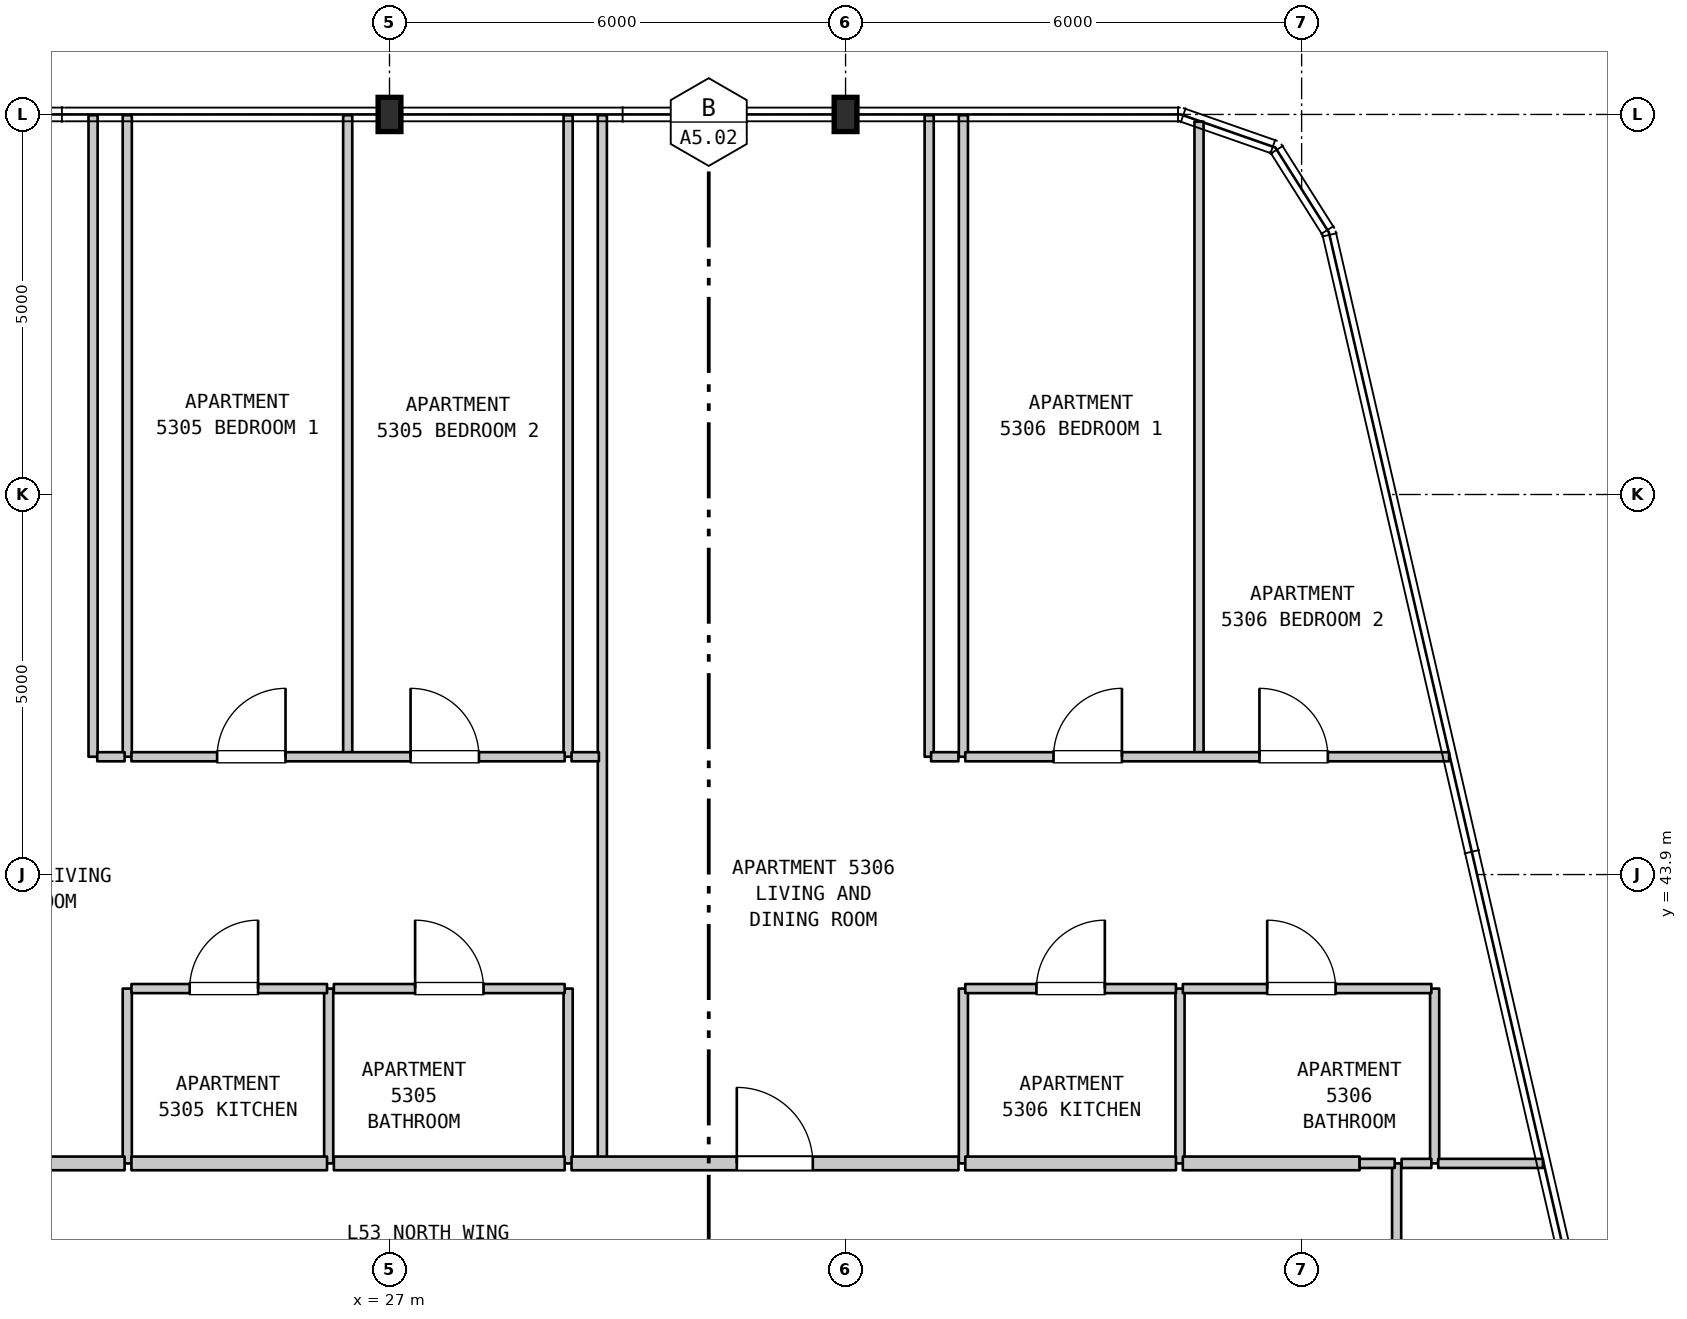
"""IFC4 building model, lengths in metres.
Left out: names, types, materials, properties, quantities, classifications, styles, units other than length and angle.
Written with IfcOpenShell. Run it as: python <this file> out.ifc"""

import sys

from ifc_helpers import new_model, si_unit, direction, frame, frame_2d, origin, origin_2d, place, context, subcontext, project, spatial, rectangle, i_section, extrude, element, fill, save


model = new_model("IFC4")
c1 = context("Model", 3, precision=1e-05, world=origin(), true_north=direction((0.0, 1.0)))
c2 = subcontext(c1, "Body", "Model", "MODEL_VIEW")
j1 = project(units=[si_unit("LENGTHUNIT", "METRE"), si_unit("PLANEANGLEUNIT", "RADIAN")], contexts=[c1])
p1 = place(None, origin())
s1 = spatial("IfcSite", under=j1, at=p1, CompositionType="ELEMENT")
p2 = place(p1, origin())
s2 = spatial("IfcBuilding", under=s1, at=p2, CompositionType="ELEMENT")
p3 = place(p2, frame((0.0, 0.0, 214.3)))
s3 = spatial("IfcBuildingStorey", under=s2, at=p3, CompositionType="ELEMENT", Elevation=214.3)
for number, where, z_axis, x_axis in (
    (1, (27.0, 53.9, 0.0), (0.0, 0.0, 1.0), (1.0, 0.0, 0.0)),
    (2, (33.0, 53.9, 0.0), (0.0, 0.0, 1.0), (1.0, 0.0, 0.0)),
):
    element("IfcColumn", number, at=place(p3, frame(where, z_axis=z_axis, x_axis=x_axis)), inside=s3, PredefinedType="COLUMN", context=c2, shape_type="SweptSolid", body=[
        extrude(i_section(OverallWidth=0.3, OverallDepth=0.45, WebThickness=0.014, FlangeThickness=0.026, FilletRadius=0.027, at=origin_2d()), origin(), (0.0, 0.0, 1.0), 3.7),
    ])
p4 = place(p3, frame((23.1, 45.45, 0.0), z_axis=(0.0, 0.0, 1.0), x_axis=(0.0, 1.0, 0.0)))
e3 = element("IfcWall", 3, at=p4, inside=s3, PredefinedType="PARTITIONING", context=c2, shape_type="SweptSolid", body=[
    extrude(rectangle(XDim=8.44, YDim=0.12, at=frame_2d((4.22, 0.0))), origin(), (0.0, 0.0, 1.0), 3.38),
])
p5 = place(p3, frame((23.55, 40.1, 0.0), z_axis=(0.0, 0.0, 1.0), x_axis=(0.0, 1.0, 0.0)))
e4 = element("IfcWall", 4, at=p5, inside=s3, PredefinedType="PARTITIONING", context=c2, shape_type="SweptSolid", body=[
    extrude(rectangle(XDim=2.3, YDim=0.12, at=frame_2d((1.15, 0.0))), origin(), (0.0, 0.0, 1.0), 3.38),
])
p6 = place(p3, frame((23.55, 45.45, 0.0), z_axis=(0.0, 0.0, 1.0), x_axis=(0.0, 1.0, 0.0)))
e5 = element("IfcWall", 5, at=p6, inside=s3, PredefinedType="PARTITIONING", context=c2, shape_type="SweptSolid", body=[
    extrude(rectangle(XDim=8.44, YDim=0.12, at=frame_2d((4.22, 0.0))), origin(), (0.0, 0.0, 1.0), 3.38),
])
p7 = place(p3, frame((26.2, 40.1, 0.0), z_axis=(0.0, 0.0, 1.0), x_axis=(0.0, 1.0, 0.0)))
e6 = element("IfcWall", 6, at=p7, inside=s3, PredefinedType="PARTITIONING", context=c2, shape_type="SweptSolid", body=[
    extrude(rectangle(XDim=2.3, YDim=0.12, at=frame_2d((1.15, 0.0))), origin(), (0.0, 0.0, 1.0), 3.38),
])
p8 = place(p3, frame((26.45, 45.45, 0.0), z_axis=(0.0, 0.0, 1.0), x_axis=(0.0, 1.0, 0.0)))
e7 = element("IfcWall", 7, at=p8, inside=s3, PredefinedType="PARTITIONING", context=c2, shape_type="SweptSolid", body=[
    extrude(rectangle(XDim=8.44, YDim=0.12, at=frame_2d((4.22, 0.0))), origin(), (0.0, 0.0, 1.0), 3.38),
])
p9 = place(p3, frame((29.35, 40.1, 0.0), z_axis=(0.0, 0.0, 1.0), x_axis=(0.0, 1.0, 0.0)))
e8 = element("IfcWall", 8, at=p9, inside=s3, PredefinedType="PARTITIONING", context=c2, shape_type="SweptSolid", body=[
    extrude(rectangle(XDim=2.3, YDim=0.12, at=frame_2d((1.15, 0.0))), origin(), (0.0, 0.0, 1.0), 3.38),
])
p10 = place(p3, frame((29.35, 45.45, 0.0), z_axis=(0.0, 0.0, 1.0), x_axis=(0.0, 1.0, 0.0)))
e9 = element("IfcWall", 9, at=p10, inside=s3, PredefinedType="PARTITIONING", context=c2, shape_type="SweptSolid", body=[
    extrude(rectangle(XDim=8.44, YDim=0.12, at=frame_2d((4.22, 0.0))), origin(), (0.0, 0.0, 1.0), 3.38),
])
p11 = place(p3, frame((29.8, 40.1, 0.0), z_axis=(0.0, 0.0, 1.0), x_axis=(0.0, 1.0, 0.0)))
e10 = element("IfcWall", 10, at=p11, inside=s3, PredefinedType="PARTITIONING", context=c2, shape_type="SweptSolid", body=[
    extrude(rectangle(XDim=13.79, YDim=0.12, at=frame_2d((6.895, 0.0))), origin(), (0.0, 0.0, 1.0), 3.38),
])
p12 = place(p3, frame((34.1, 45.45, 0.0), z_axis=(0.0, 0.0, 1.0), x_axis=(0.0, 1.0, 0.0)))
e11 = element("IfcWall", 11, at=p12, inside=s3, PredefinedType="PARTITIONING", context=c2, shape_type="SweptSolid", body=[
    extrude(rectangle(XDim=8.44, YDim=0.12, at=frame_2d((4.22, 0.0))), origin(), (0.0, 0.0, 1.0), 3.38),
])
p13 = place(p3, frame((34.55, 40.1, 0.0), z_axis=(0.0, 0.0, 1.0), x_axis=(0.0, 1.0, 0.0)))
e12 = element("IfcWall", 12, at=p13, inside=s3, PredefinedType="PARTITIONING", context=c2, shape_type="SweptSolid", body=[
    extrude(rectangle(XDim=2.3, YDim=0.12, at=frame_2d((1.15, 0.0))), origin(), (0.0, 0.0, 1.0), 3.38),
])
p14 = place(p3, frame((34.55, 45.45, 0.0), z_axis=(0.0, 0.0, 1.0), x_axis=(0.0, 1.0, 0.0)))
e13 = element("IfcWall", 13, at=p14, inside=s3, PredefinedType="PARTITIONING", context=c2, shape_type="SweptSolid", body=[
    extrude(rectangle(XDim=8.44, YDim=0.12, at=frame_2d((4.22, 0.0))), origin(), (0.0, 0.0, 1.0), 3.38),
])
p15 = place(p3, frame((37.4, 40.1, 0.0), z_axis=(0.0, 0.0, 1.0), x_axis=(0.0, 1.0, 0.0)))
e14 = element("IfcWall", 14, at=p15, inside=s3, PredefinedType="PARTITIONING", context=c2, shape_type="SweptSolid", body=[
    extrude(rectangle(XDim=2.3, YDim=0.12, at=frame_2d((1.15, 0.0))), origin(), (0.0, 0.0, 1.0), 3.38),
])
p16 = place(p3, frame((37.65, 45.45, 0.0), z_axis=(0.0, 0.0, 1.0), x_axis=(0.0, 1.0, 0.0)))
e15 = element("IfcWall", 15, at=p16, inside=s3, PredefinedType="PARTITIONING", context=c2, shape_type="SweptSolid", body=[
    extrude(rectangle(XDim=8.356, YDim=0.12, at=frame_2d((4.178, 0.0))), origin(), (0.0, 0.0, 1.0), 3.38),
])
p17 = place(p3, frame((40.25, 37.9, 0.0), z_axis=(0.0, 0.0, 1.0), x_axis=(0.0, 1.0, 0.0)))
e16 = element("IfcWall", 16, at=p17, inside=s3, PredefinedType="PARTITIONING", context=c2, shape_type="SweptSolid", body=[
    extrude(rectangle(XDim=2.2, YDim=0.12, at=frame_2d((1.1, 0.0))), origin(), (0.0, 0.0, 1.0), 3.38),
])
p18 = place(p3, frame((40.75, 40.1, 0.0), z_axis=(0.0, 0.0, 1.0), x_axis=(0.0, 1.0, 0.0)))
e17 = element("IfcWall", 17, at=p18, inside=s3, PredefinedType="PARTITIONING", context=c2, shape_type="SweptSolid", body=[
    extrude(rectangle(XDim=2.3, YDim=0.12, at=frame_2d((1.15, 0.0))), origin(), (0.0, 0.0, 1.0), 3.38),
])
p19 = place(p3, frame((19.555, 40.1, 0.0), z_axis=(0.0, 0.0, 1.0), x_axis=(1.0, 0.0, 0.0)))
e18 = element("IfcWall", 18, at=p19, inside=s3, PredefinedType="STANDARD", context=c2, shape_type="SweptSolid", body=[
    extrude(rectangle(XDim=3.96, YDim=0.18, at=frame_2d((1.98, 0.0))), origin(), (0.0, 0.0, 1.0), 3.38),
])
p20 = place(p19, frame((1.48, 0.0, 0.0)))
e19 = element("IfcOpeningElement", 19, at=p20, cuts=e18, PredefinedType="OPENING", context=c2, shape_type="SweptSolid", body=[
    extrude(rectangle(XDim=1.0, YDim=2.15, at=frame_2d((0.5, 1.075))), frame((0.0, 0.1, 0.0), z_axis=(0.0, -1.0, 0.0), x_axis=(1.0, 0.0, 0.0)), (0.0, 0.0, 1.0), 0.2),
])
p21 = place(p3, frame((23.605, 40.1, 0.0), z_axis=(0.0, 0.0, 1.0), x_axis=(1.0, 0.0, 0.0)))
e20 = element("IfcWall", 20, at=p21, inside=s3, PredefinedType="STANDARD", context=c2, shape_type="SweptSolid", body=[
    extrude(rectangle(XDim=2.573, YDim=0.18, at=frame_2d((1.287, 0.0))), origin(), (0.0, 0.0, 1.0), 3.38),
])
p22 = place(p3, frame((26.268, 40.1, 0.0), z_axis=(0.0, 0.0, 1.0), x_axis=(1.0, 0.0, 0.0)))
e21 = element("IfcWall", 21, at=p22, inside=s3, PredefinedType="STANDARD", context=c2, shape_type="SweptSolid", body=[
    extrude(rectangle(XDim=3.037, YDim=0.18, at=frame_2d((1.519, 0.0))), origin(), (0.0, 0.0, 1.0), 3.38),
])
p23 = place(p3, frame((29.395, 40.1, 0.0), z_axis=(0.0, 0.0, 1.0), x_axis=(1.0, 0.0, 0.0)))
e22 = element("IfcWall", 22, at=p23, inside=s3, PredefinedType="STANDARD", context=c2, shape_type="SweptSolid", body=[
    extrude(rectangle(XDim=5.09, YDim=0.18, at=frame_2d((2.545, 0.0))), origin(), (0.0, 0.0, 1.0), 3.38),
])
p24 = place(p23, frame((2.174, 0.0, 0.0)))
e23 = element("IfcOpeningElement", 23, at=p24, cuts=e22, PredefinedType="OPENING", context=c2, shape_type="SweptSolid", body=[
    extrude(rectangle(XDim=1.0, YDim=2.15, at=frame_2d((0.5, 1.075))), frame((0.0, 0.1, 0.0), z_axis=(0.0, -1.0, 0.0), x_axis=(1.0, 0.0, 0.0)), (0.0, 0.0, 1.0), 0.2),
])
p25 = place(p3, frame((34.575, 40.1, 0.0), z_axis=(0.0, 0.0, 1.0), x_axis=(1.0, 0.0, 0.0)))
e24 = element("IfcWall", 24, at=p25, inside=s3, PredefinedType="STANDARD", context=c2, shape_type="SweptSolid", body=[
    extrude(rectangle(XDim=2.772, YDim=0.18, at=frame_2d((1.386, 0.0))), origin(), (0.0, 0.0, 1.0), 3.38),
])
p26 = place(p3, frame((37.437, 40.1, 0.0), z_axis=(0.0, 0.0, 1.0), x_axis=(1.0, 0.0, 0.0)))
e25 = element("IfcWall", 25, at=p26, inside=s3, PredefinedType="STANDARD", context=c2, shape_type="SweptSolid", body=[
    extrude(rectangle(XDim=2.326, YDim=0.18, at=frame_2d((1.163, 0.0))), origin(), (0.0, 0.0, 1.0), 3.38),
])
p27 = place(p3, frame((39.763, 40.1, 0.0), z_axis=(0.0, 0.0, 1.0), x_axis=(1.0, 0.0, 0.0)))
e26 = element("IfcWall", 26, at=p27, inside=s3, PredefinedType="PARTITIONING", context=c2, shape_type="SweptSolid", body=[
    extrude(rectangle(XDim=0.462, YDim=0.12, at=frame_2d((0.231, 0.0))), origin(), (0.0, 0.0, 1.0), 3.38),
])
p28 = place(p3, frame((40.315, 40.1, 0.0), z_axis=(0.0, 0.0, 1.0), x_axis=(1.0, 0.0, 0.0)))
e27 = element("IfcWall", 27, at=p28, inside=s3, PredefinedType="PARTITIONING", context=c2, shape_type="SweptSolid", body=[
    extrude(rectangle(XDim=0.392, YDim=0.12, at=frame_2d((0.196, 0.0))), origin(), (0.0, 0.0, 1.0), 3.38),
])
p29 = place(p3, frame((40.797, 40.1, 0.0), z_axis=(0.0, 0.0, 1.0), x_axis=(1.0, 0.0, 0.0)))
e28 = element("IfcWall", 28, at=p29, inside=s3, PredefinedType="PARTITIONING", context=c2, shape_type="SweptSolid", body=[
    extrude(rectangle(XDim=1.378, YDim=0.12, at=frame_2d((0.689, 0.0))), origin(), (0.0, 0.0, 1.0), 3.38),
])
p30 = place(p3, frame((23.605, 42.4, 0.0), z_axis=(0.0, 0.0, 1.0), x_axis=(1.0, 0.0, 0.0)))
e29 = element("IfcWall", 29, at=p30, inside=s3, PredefinedType="PARTITIONING", context=c2, shape_type="SweptSolid", body=[
    extrude(rectangle(XDim=2.573, YDim=0.12, at=frame_2d((1.287, 0.0))), origin(), (0.0, 0.0, 1.0), 3.38),
])
p31 = place(p30, frame((0.766, 0.0, 0.0)))
e30 = element("IfcOpeningElement", 30, at=p31, cuts=e29, PredefinedType="OPENING", context=c2, shape_type="SweptSolid", body=[
    extrude(rectangle(XDim=0.9, YDim=2.15, at=frame_2d((0.45, 1.075))), frame((0.0, 0.07, 0.0), z_axis=(0.0, -1.0, 0.0), x_axis=(1.0, 0.0, 0.0)), (0.0, 0.0, 1.0), 0.14),
])
p32 = place(p3, frame((26.268, 42.4, 0.0), z_axis=(0.0, 0.0, 1.0), x_axis=(1.0, 0.0, 0.0)))
e31 = element("IfcWall", 31, at=p32, inside=s3, PredefinedType="PARTITIONING", context=c2, shape_type="SweptSolid", body=[
    extrude(rectangle(XDim=3.037, YDim=0.12, at=frame_2d((1.519, 0.0))), origin(), (0.0, 0.0, 1.0), 3.38),
])
p33 = place(p32, frame((1.069, 0.0, 0.0)))
e32 = element("IfcOpeningElement", 32, at=p33, cuts=e31, PredefinedType="OPENING", context=c2, shape_type="SweptSolid", body=[
    extrude(rectangle(XDim=0.9, YDim=2.1, at=frame_2d((0.45, 1.05))), frame((0.0, 0.07, 0.0), z_axis=(0.0, -1.0, 0.0), x_axis=(1.0, 0.0, 0.0)), (0.0, 0.0, 1.0), 0.14),
])
p34 = place(p3, frame((34.575, 42.4, 0.0), z_axis=(0.0, 0.0, 1.0), x_axis=(1.0, 0.0, 0.0)))
e33 = element("IfcWall", 33, at=p34, inside=s3, PredefinedType="PARTITIONING", context=c2, shape_type="SweptSolid", body=[
    extrude(rectangle(XDim=2.772, YDim=0.12, at=frame_2d((1.386, 0.0))), origin(), (0.0, 0.0, 1.0), 3.38),
])
p35 = place(p34, frame((0.936, 0.0, 0.0)))
e34 = element("IfcOpeningElement", 34, at=p35, cuts=e33, PredefinedType="OPENING", context=c2, shape_type="SweptSolid", body=[
    extrude(rectangle(XDim=0.9, YDim=2.15, at=frame_2d((0.45, 1.075))), frame((0.0, 0.07, 0.0), z_axis=(0.0, -1.0, 0.0), x_axis=(1.0, 0.0, 0.0)), (0.0, 0.0, 1.0), 0.14),
])
p36 = place(p3, frame((37.437, 42.4, 0.0), z_axis=(0.0, 0.0, 1.0), x_axis=(1.0, 0.0, 0.0)))
e35 = element("IfcWall", 35, at=p36, inside=s3, PredefinedType="PARTITIONING", context=c2, shape_type="SweptSolid", body=[
    extrude(rectangle(XDim=3.27, YDim=0.12, at=frame_2d((1.635, 0.0))), origin(), (0.0, 0.0, 1.0), 3.38),
])
p37 = place(p36, frame((1.11, 0.0, 0.0)))
e36 = element("IfcOpeningElement", 36, at=p37, cuts=e35, PredefinedType="OPENING", context=c2, shape_type="SweptSolid", body=[
    extrude(rectangle(XDim=0.9, YDim=2.1, at=frame_2d((0.45, 1.05))), frame((0.0, 0.07, 0.0), z_axis=(0.0, -1.0, 0.0), x_axis=(1.0, 0.0, 0.0)), (0.0, 0.0, 1.0), 0.14),
])
p38 = place(p3, frame((23.155, 45.45, 0.0), z_axis=(0.0, 0.0, 1.0), x_axis=(1.0, 0.0, 0.0)))
e37 = element("IfcWall", 37, at=p38, inside=s3, PredefinedType="PARTITIONING", context=c2, shape_type="SweptSolid", body=[
    extrude(rectangle(XDim=0.36, YDim=0.12, at=frame_2d((0.18, 0.0))), origin(), (0.0, 0.0, 1.0), 3.38),
])
p39 = place(p3, frame((23.605, 45.45, 0.0), z_axis=(0.0, 0.0, 1.0), x_axis=(1.0, 0.0, 0.0)))
e38 = element("IfcWall", 38, at=p39, inside=s3, PredefinedType="PARTITIONING", context=c2, shape_type="SweptSolid", body=[
    extrude(rectangle(XDim=5.7, YDim=0.12, at=frame_2d((2.85, 0.0))), origin(), (0.0, 0.0, 1.0), 3.38),
])
p40 = place(p39, frame((1.127, 0.0, 0.0)))
e39 = element("IfcOpeningElement", 39, at=p40, cuts=e38, PredefinedType="OPENING", context=c2, shape_type="SweptSolid", body=[
    extrude(rectangle(XDim=0.9, YDim=2.15, at=frame_2d((0.45, 1.075))), frame((0.0, 0.07, 0.0), z_axis=(0.0, -1.0, 0.0), x_axis=(1.0, 0.0, 0.0)), (0.0, 0.0, 1.0), 0.14),
])
p41 = place(p39, frame((3.672, 0.0, 0.0)))
e40 = element("IfcOpeningElement", 40, at=p41, cuts=e38, PredefinedType="OPENING", context=c2, shape_type="SweptSolid", body=[
    extrude(rectangle(XDim=0.9, YDim=2.15, at=frame_2d((0.45, 1.075))), frame((0.0, 0.07, 0.0), z_axis=(0.0, -1.0, 0.0), x_axis=(1.0, 0.0, 0.0)), (0.0, 0.0, 1.0), 0.14),
])
p42 = place(p3, frame((29.395, 45.45, 0.0), z_axis=(0.0, 0.0, 1.0), x_axis=(1.0, 0.0, 0.0)))
e41 = element("IfcWall", 41, at=p42, inside=s3, PredefinedType="PARTITIONING", context=c2, shape_type="SweptSolid", body=[
    extrude(rectangle(XDim=0.36, YDim=0.12, at=frame_2d((0.18, 0.0))), origin(), (0.0, 0.0, 1.0), 3.38),
])
p43 = place(p3, frame((34.125, 45.45, 0.0), z_axis=(0.0, 0.0, 1.0), x_axis=(1.0, 0.0, 0.0)))
e42 = element("IfcWall", 42, at=p43, inside=s3, PredefinedType="PARTITIONING", context=c2, shape_type="SweptSolid", body=[
    extrude(rectangle(XDim=0.36, YDim=0.12, at=frame_2d((0.18, 0.0))), origin(), (0.0, 0.0, 1.0), 3.38),
])
p44 = place(p3, frame((34.575, 45.45, 0.0), z_axis=(0.0, 0.0, 1.0), x_axis=(1.0, 0.0, 0.0)))
e43 = element("IfcWall", 43, at=p44, inside=s3, PredefinedType="PARTITIONING", context=c2, shape_type="SweptSolid", body=[
    extrude(rectangle(XDim=6.365, YDim=0.12, at=frame_2d((3.183, 0.0))), origin(), (0.0, 0.0, 1.0), 3.38),
])
p45 = place(p44, frame((1.161, 0.0, 0.0)))
e44 = element("IfcOpeningElement", 44, at=p45, cuts=e43, PredefinedType="OPENING", context=c2, shape_type="SweptSolid", body=[
    extrude(rectangle(XDim=0.9, YDim=2.15, at=frame_2d((0.45, 1.075))), frame((0.0, 0.07, 0.0), z_axis=(0.0, -1.0, 0.0), x_axis=(1.0, 0.0, 0.0)), (0.0, 0.0, 1.0), 0.14),
])
p46 = place(p44, frame((3.87, 0.0, 0.0)))
e45 = element("IfcOpeningElement", 45, at=p46, cuts=e43, PredefinedType="OPENING", context=c2, shape_type="SweptSolid", body=[
    extrude(rectangle(XDim=0.9, YDim=2.15, at=frame_2d((0.45, 1.075))), frame((0.0, 0.07, 0.0), z_axis=(0.0, -1.0, 0.0), x_axis=(1.0, 0.0, 0.0)), (0.0, 0.0, 1.0), 0.14),
])
p47 = place(p24, origin())
e46 = element("IfcDoor", 46, at=p47, inside=s3, OperationType="SINGLE_SWING_LEFT", PredefinedType="DOOR", context=c2, shape_type="SweptSolid", body=[
    extrude(rectangle(XDim=1.0, YDim=2.15, at=frame_2d((0.5, 1.075))), frame((0.0, 0.025, 0.0), z_axis=(0.0, -1.0, 0.0), x_axis=(1.0, 0.0, 0.0)), (0.0, 0.0, 1.0), 0.05),
])
fill(e23, e46)
p48 = place(p31, origin())
e47 = element("IfcDoor", 47, at=p48, inside=s3, OperationType="SINGLE_SWING_RIGHT", PredefinedType="DOOR", context=c2, shape_type="SweptSolid", body=[
    extrude(rectangle(XDim=0.9, YDim=2.15, at=frame_2d((0.45, 1.075))), frame((0.0, 0.025, 0.0), z_axis=(0.0, -1.0, 0.0), x_axis=(1.0, 0.0, 0.0)), (0.0, 0.0, 1.0), 0.05),
])
fill(e30, e47)
p49 = place(p33, origin())
e48 = element("IfcDoor", 48, at=p49, inside=s3, OperationType="SINGLE_SWING_LEFT", PredefinedType="DOOR", context=c2, shape_type="SweptSolid", body=[
    extrude(rectangle(XDim=0.9, YDim=2.1, at=frame_2d((0.45, 1.05))), frame((0.0, 0.025, 0.0), z_axis=(0.0, -1.0, 0.0), x_axis=(1.0, 0.0, 0.0)), (0.0, 0.0, 1.0), 0.05),
])
fill(e32, e48)
p50 = place(p35, origin())
e49 = element("IfcDoor", 49, at=p50, inside=s3, OperationType="SINGLE_SWING_RIGHT", PredefinedType="DOOR", context=c2, shape_type="SweptSolid", body=[
    extrude(rectangle(XDim=0.9, YDim=2.15, at=frame_2d((0.45, 1.075))), frame((0.0, 0.025, 0.0), z_axis=(0.0, -1.0, 0.0), x_axis=(1.0, 0.0, 0.0)), (0.0, 0.0, 1.0), 0.05),
])
fill(e34, e49)
p51 = place(p37, origin())
e50 = element("IfcDoor", 50, at=p51, inside=s3, OperationType="SINGLE_SWING_LEFT", PredefinedType="DOOR", context=c2, shape_type="SweptSolid", body=[
    extrude(rectangle(XDim=0.9, YDim=2.1, at=frame_2d((0.45, 1.05))), frame((0.0, 0.025, 0.0), z_axis=(0.0, -1.0, 0.0), x_axis=(1.0, 0.0, 0.0)), (0.0, 0.0, 1.0), 0.05),
])
fill(e36, e50)
p52 = place(p40, origin())
e51 = element("IfcDoor", 51, at=p52, inside=s3, OperationType="SINGLE_SWING_RIGHT", PredefinedType="DOOR", context=c2, shape_type="SweptSolid", body=[
    extrude(rectangle(XDim=0.9, YDim=2.15, at=frame_2d((0.45, 1.075))), frame((0.0, 0.025, 0.0), z_axis=(0.0, -1.0, 0.0), x_axis=(1.0, 0.0, 0.0)), (0.0, 0.0, 1.0), 0.05),
])
fill(e39, e51)
p53 = place(p41, origin())
e52 = element("IfcDoor", 52, at=p53, inside=s3, OperationType="SINGLE_SWING_LEFT", PredefinedType="DOOR", context=c2, shape_type="SweptSolid", body=[
    extrude(rectangle(XDim=0.9, YDim=2.15, at=frame_2d((0.45, 1.075))), frame((0.0, 0.025, 0.0), z_axis=(0.0, -1.0, 0.0), x_axis=(1.0, 0.0, 0.0)), (0.0, 0.0, 1.0), 0.05),
])
fill(e40, e52)
p54 = place(p45, origin())
e53 = element("IfcDoor", 53, at=p54, inside=s3, OperationType="SINGLE_SWING_RIGHT", PredefinedType="DOOR", context=c2, shape_type="SweptSolid", body=[
    extrude(rectangle(XDim=0.9, YDim=2.15, at=frame_2d((0.45, 1.075))), frame((0.0, 0.025, 0.0), z_axis=(0.0, -1.0, 0.0), x_axis=(1.0, 0.0, 0.0)), (0.0, 0.0, 1.0), 0.05),
])
fill(e44, e53)
p55 = place(p46, origin())
e54 = element("IfcDoor", 54, at=p55, inside=s3, OperationType="SINGLE_SWING_LEFT", PredefinedType="DOOR", context=c2, shape_type="SweptSolid", body=[
    extrude(rectangle(XDim=0.9, YDim=2.15, at=frame_2d((0.45, 1.075))), frame((0.0, 0.025, 0.0), z_axis=(0.0, -1.0, 0.0), x_axis=(1.0, 0.0, 0.0)), (0.0, 0.0, 1.0), 0.05),
])
fill(e45, e54)
save(model, sys.argv[1])
